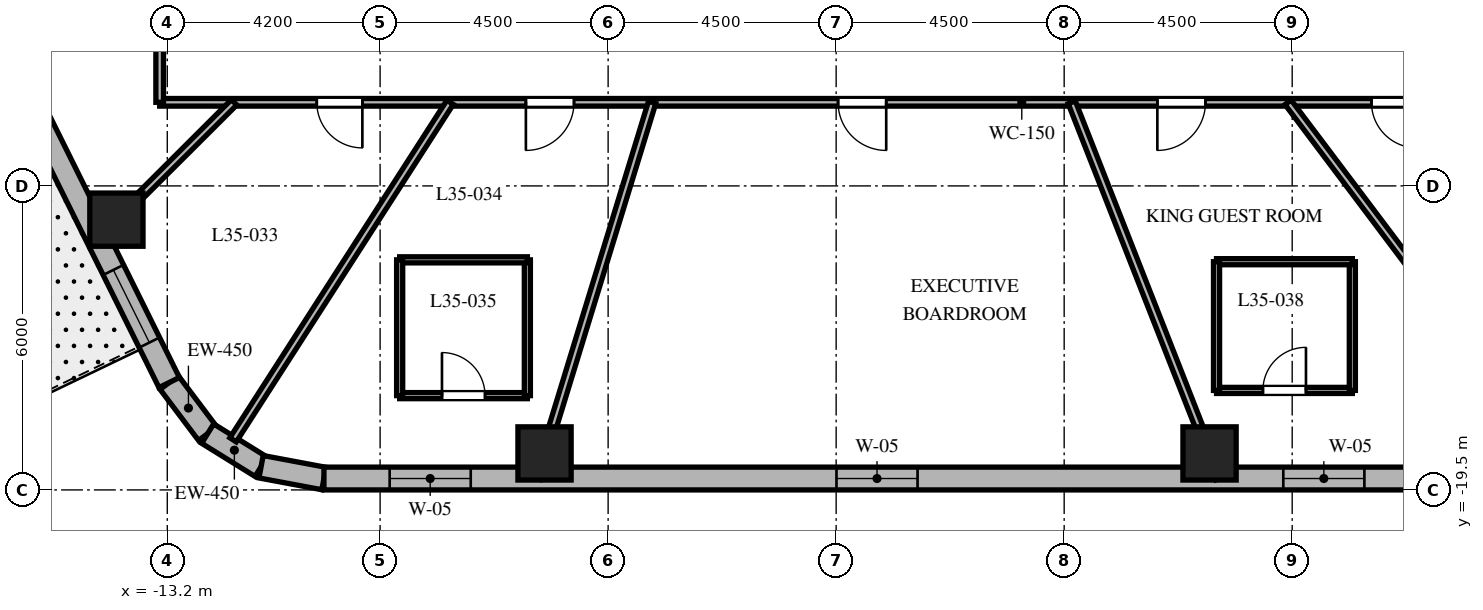
"""IFC4 building model, lengths in metres.
Left out: names, types, materials, properties, quantities, classifications, styles, units other than length and angle.
Written with IfcOpenShell. Run it as: python <this file> out.ifc"""

import sys

from ifc_helpers import new_model, si_unit, direction, frame, frame_2d, origin, origin_2d, place, context, subcontext, project, spatial, rectangle, extrude, element, fill, save


model = new_model("IFC4")
c1 = context("Model", 3, precision=1e-05, world=origin(), true_north=direction((0.0, 1.0)))
c2 = subcontext(c1, "Body", "Model", "MODEL_VIEW")
j1 = project(units=[si_unit("LENGTHUNIT", "METRE"), si_unit("PLANEANGLEUNIT", "RADIAN")], contexts=[c1])
p1 = place(None, origin())
s1 = spatial("IfcSite", under=j1, at=p1, CompositionType="ELEMENT")
p2 = place(p1, origin())
s2 = spatial("IfcBuilding", under=s1, at=p2, CompositionType="ELEMENT")
p3 = place(p2, frame((0.0, 0.0, 144.3)))
s3 = spatial("IfcBuildingStorey", under=s2, at=p3, CompositionType="ELEMENT", Elevation=144.3)
for number, where, z_axis, x_axis in (
    (1, (-5.755, -18.78, 0.0), (0.0, 0.0, 1.0), (1.0, 0.0, 0.0)),
    (2, (7.369, -18.78, 0.0), (0.0, 0.0, 1.0), (1.0, 0.0, 0.0)),
    (3, (-14.204, -14.166, 0.0), (0.0, 0.0, 1.0), (1.0, 0.0, 0.0)),
):
    element("IfcColumn", number, at=place(p3, frame(where, z_axis=z_axis, x_axis=x_axis)), inside=s3, PredefinedType="COLUMN", context=c2, shape_type="SweptSolid", body=[
        extrude(rectangle(XDim=1.05, YDim=1.05, at=origin_2d()), origin(), (0.0, 0.0, 1.0), 3.7),
    ])
p4 = place(p3, frame((-13.162, -17.381, 0.0), z_axis=(0.0, 0.0, 1.0), x_axis=(0.601515770517, -0.798860925205, 0.0)))
e4 = element("IfcWall", 4, at=p4, inside=s3, PredefinedType="SOLIDWALL", context=c2, shape_type="SweptSolid", body=[
    extrude(rectangle(XDim=1.262, YDim=0.45, at=frame_2d((0.631, 0.0))), origin(), (0.0, 0.0, 1.0), 3.4),
])
p5 = place(p3, frame((-12.403, -18.389, 0.0), z_axis=(0.0, 0.0, 1.0), x_axis=(0.849795170926, -0.527113049991, 0.0)))
e5 = element("IfcWall", 5, at=p5, inside=s3, PredefinedType="SOLIDWALL", context=c2, shape_type="SweptSolid", body=[
    extrude(rectangle(XDim=1.241, YDim=0.45, at=frame_2d((0.62, 0.0))), origin(), (0.0, 0.0, 1.0), 3.4),
])
p6 = place(p3, frame((-11.349, -19.043, 0.0), z_axis=(0.0, 0.0, 1.0), x_axis=(0.982931267051, -0.183973161772, 0.0)))
e6 = element("IfcWall", 6, at=p6, inside=s3, PredefinedType="SOLIDWALL", context=c2, shape_type="SweptSolid", body=[
    extrude(rectangle(XDim=1.262, YDim=0.45, at=frame_2d((0.631, 0.0))), origin(), (0.0, 0.0, 1.0), 3.4),
])
p7 = place(p3, frame((-10.108, -19.275, 0.0), z_axis=(0.0, 0.0, 1.0), x_axis=(1.0, 0.0, 0.0)))
e7 = element("IfcWall", 7, at=p7, inside=s3, PredefinedType="SOLIDWALL", context=c2, shape_type="SweptSolid", body=[
    extrude(rectangle(XDim=21.829, YDim=0.45, at=frame_2d((10.915, 0.0))), origin(), (0.0, 0.0, 1.0), 3.4),
])
p8 = place(p7, frame((1.297, 0.0, 0.8)))
e8 = element("IfcOpeningElement", 8, at=p8, cuts=e7, PredefinedType="OPENING", context=c2, shape_type="SweptSolid", body=[
    extrude(rectangle(XDim=1.6, YDim=1.75, at=frame_2d((0.8, 0.875))), frame((0.0, 0.235, 0.0), z_axis=(0.0, -1.0, 0.0), x_axis=(1.0, 0.0, 0.0)), (0.0, 0.0, 1.0), 0.47),
])
p9 = place(p7, frame((10.115, 0.0, 0.8)))
e9 = element("IfcOpeningElement", 9, at=p9, cuts=e7, PredefinedType="OPENING", context=c2, shape_type="SweptSolid", body=[
    extrude(rectangle(XDim=1.6, YDim=1.75, at=frame_2d((0.8, 0.875))), frame((0.0, 0.235, 0.0), z_axis=(0.0, -1.0, 0.0), x_axis=(1.0, 0.0, 0.0)), (0.0, 0.0, 1.0), 0.47),
])
p10 = place(p7, frame((18.933, 0.0, 0.8)))
e10 = element("IfcOpeningElement", 10, at=p10, cuts=e7, PredefinedType="OPENING", context=c2, shape_type="SweptSolid", body=[
    extrude(rectangle(XDim=1.6, YDim=1.75, at=frame_2d((0.8, 0.875))), frame((0.0, 0.235, 0.0), z_axis=(0.0, -1.0, 0.0), x_axis=(1.0, 0.0, 0.0)), (0.0, 0.0, 1.0), 0.47),
])
p11 = place(p3, frame((-20.618, -2.344, 0.0), z_axis=(0.0, 0.0, 1.0), x_axis=(0.444243691097, -0.895905990002, 0.0)))
e11 = element("IfcWall", 11, at=p11, inside=s3, PredefinedType="SOLIDWALL", context=c2, shape_type="SweptSolid", body=[
    extrude(rectangle(XDim=16.784, YDim=0.45, at=frame_2d((8.392, 0.0))), origin(), (0.0, 0.0, 1.0), 3.4),
])
p12 = place(p11, frame((4.535, 0.0, 0.0)))
e12 = element("IfcOpeningElement", 12, at=p12, cuts=e11, PredefinedType="OPENING", context=c2, shape_type="SweptSolid", body=[
    extrude(rectangle(XDim=0.95, YDim=2.15, at=frame_2d((0.475, 1.075))), frame((0.0, 0.235, 0.0), z_axis=(0.0, -1.0, 0.0), x_axis=(1.0, 0.0, 0.0)), (0.0, 0.0, 1.0), 0.47),
])
p13 = place(p11, frame((0.931, 0.0, 0.8)))
e13 = element("IfcOpeningElement", 13, at=p13, cuts=e11, PredefinedType="OPENING", context=c2, shape_type="SweptSolid", body=[
    extrude(rectangle(XDim=1.6, YDim=1.75, at=frame_2d((0.8, 0.875))), frame((0.0, 0.235, 0.0), z_axis=(0.0, -1.0, 0.0), x_axis=(1.0, 0.0, 0.0)), (0.0, 0.0, 1.0), 0.47),
])
p14 = place(p11, frame((7.642, 0.0, 0.8)))
e14 = element("IfcOpeningElement", 14, at=p14, cuts=e11, PredefinedType="OPENING", context=c2, shape_type="SweptSolid", body=[
    extrude(rectangle(XDim=1.6, YDim=1.75, at=frame_2d((0.8, 0.875))), frame((0.0, 0.235, 0.0), z_axis=(0.0, -1.0, 0.0), x_axis=(1.0, 0.0, 0.0)), (0.0, 0.0, 1.0), 0.47),
])
p15 = place(p11, frame((14.303, 0.0, 0.8)))
e15 = element("IfcOpeningElement", 15, at=p15, cuts=e11, PredefinedType="OPENING", context=c2, shape_type="SweptSolid", body=[
    extrude(rectangle(XDim=1.6, YDim=1.75, at=frame_2d((0.8, 0.875))), frame((0.0, 0.235, 0.0), z_axis=(0.0, -1.0, 0.0), x_axis=(1.0, 0.0, 0.0)), (0.0, 0.0, 1.0), 0.47),
])
p16 = place(p3, frame((13.35, -11.85, 0.0), z_axis=(0.0, 0.0, 1.0), x_axis=(-1.0, 0.0, 0.0)))
e16 = element("IfcWall", 16, at=p16, inside=s3, PredefinedType="PARTITIONING", context=c2, shape_type="SweptSolid", body=[
    extrude(rectangle(XDim=26.7, YDim=0.15, at=frame_2d((13.35, 0.0))), origin(), (0.0, 0.0, 1.0), 2.84),
])
p17 = place(p16, frame((22.7, 0.0, 0.0)))
e17 = element("IfcOpeningElement", 17, at=p17, cuts=e16, PredefinedType="OPENING", context=c2, shape_type="SweptSolid", body=[
    extrude(rectangle(XDim=0.9, YDim=2.03, at=frame_2d((0.45, 1.015))), frame((0.0, 0.085, 0.0), z_axis=(0.0, -1.0, 0.0), x_axis=(1.0, 0.0, 0.0)), (0.0, 0.0, 1.0), 0.17),
])
p18 = place(p16, frame((18.523, 0.0, 0.0)))
e18 = element("IfcOpeningElement", 18, at=p18, cuts=e16, PredefinedType="OPENING", context=c2, shape_type="SweptSolid", body=[
    extrude(rectangle(XDim=0.95, YDim=2.03, at=frame_2d((0.475, 1.015))), frame((0.0, 0.085, 0.0), z_axis=(0.0, -1.0, 0.0), x_axis=(1.0, 0.0, 0.0)), (0.0, 0.0, 1.0), 0.17),
])
p19 = place(p16, frame((12.362, 0.0, 0.0)))
e19 = element("IfcOpeningElement", 19, at=p19, cuts=e16, PredefinedType="OPENING", context=c2, shape_type="SweptSolid", body=[
    extrude(rectangle(XDim=0.95, YDim=2.03, at=frame_2d((0.475, 1.015))), frame((0.0, 0.085, 0.0), z_axis=(0.0, -1.0, 0.0), x_axis=(1.0, 0.0, 0.0)), (0.0, 0.0, 1.0), 0.17),
])
p20 = place(p16, frame((6.061, 0.0, 0.0)))
e20 = element("IfcOpeningElement", 20, at=p20, cuts=e16, PredefinedType="OPENING", context=c2, shape_type="SweptSolid", body=[
    extrude(rectangle(XDim=0.95, YDim=2.03, at=frame_2d((0.475, 1.015))), frame((0.0, 0.085, 0.0), z_axis=(0.0, -1.0, 0.0), x_axis=(1.0, 0.0, 0.0)), (0.0, 0.0, 1.0), 0.17),
])
p21 = place(p16, frame((1.886, 0.0, 0.0)))
e21 = element("IfcOpeningElement", 21, at=p21, cuts=e16, PredefinedType="OPENING", context=c2, shape_type="SweptSolid", body=[
    extrude(rectangle(XDim=0.9, YDim=2.03, at=frame_2d((0.45, 1.015))), frame((0.0, 0.085, 0.0), z_axis=(0.0, -1.0, 0.0), x_axis=(1.0, 0.0, 0.0)), (0.0, 0.0, 1.0), 0.17),
])
p22 = place(p3, frame((-13.35, -11.85, 0.0), z_axis=(0.0, 0.0, 1.0), x_axis=(0.0, 1.0, 0.0)))
e22 = element("IfcWall", 22, at=p22, inside=s3, PredefinedType="PARTITIONING", context=c2, shape_type="SweptSolid", body=[
    extrude(rectangle(XDim=23.7, YDim=0.15, at=frame_2d((11.85, 0.0))), origin(), (0.0, 0.0, 1.0), 2.84),
])
p23 = place(p22, frame((18.389, 0.0, 0.0)))
e23 = element("IfcOpeningElement", 23, at=p23, cuts=e22, PredefinedType="OPENING", context=c2, shape_type="SweptSolid", body=[
    extrude(rectangle(XDim=0.95, YDim=2.03, at=frame_2d((0.475, 1.015))), frame((0.0, 0.085, 0.0), z_axis=(0.0, -1.0, 0.0), x_axis=(1.0, 0.0, 0.0)), (0.0, 0.0, 1.0), 0.17),
])
p24 = place(p22, frame((12.315, 0.0, 0.0)))
e24 = element("IfcOpeningElement", 24, at=p24, cuts=e22, PredefinedType="OPENING", context=c2, shape_type="SweptSolid", body=[
    extrude(rectangle(XDim=0.9, YDim=2.03, at=frame_2d((0.45, 1.015))), frame((0.0, 0.085, 0.0), z_axis=(0.0, -1.0, 0.0), x_axis=(1.0, 0.0, 0.0)), (0.0, 0.0, 1.0), 0.17),
])
p25 = place(p22, frame((9.27, 0.0, 0.0)))
e25 = element("IfcOpeningElement", 25, at=p25, cuts=e22, PredefinedType="OPENING", context=c2, shape_type="SweptSolid", body=[
    extrude(rectangle(XDim=0.9, YDim=2.03, at=frame_2d((0.45, 1.015))), frame((0.0, 0.085, 0.0), z_axis=(0.0, -1.0, 0.0), x_axis=(1.0, 0.0, 0.0)), (0.0, 0.0, 1.0), 0.17),
])
p26 = place(p22, frame((3.765, 0.0, 0.0)))
e26 = element("IfcOpeningElement", 26, at=p26, cuts=e22, PredefinedType="OPENING", context=c2, shape_type="SweptSolid", body=[
    extrude(rectangle(XDim=0.9, YDim=2.03, at=frame_2d((0.45, 1.015))), frame((0.0, 0.085, 0.0), z_axis=(0.0, -1.0, 0.0), x_axis=(1.0, 0.0, 0.0)), (0.0, 0.0, 1.0), 0.17),
])
p27 = place(p3, frame((-11.882, -11.85, 0.0), z_axis=(0.0, 0.0, 1.0), x_axis=(-0.708037373639, -0.706174962407, 0.0)))
e27 = element("IfcWall", 27, at=p27, inside=s3, PredefinedType="PARTITIONING", context=c2, shape_type="SweptSolid", body=[
    extrude(rectangle(XDim=3.802, YDim=0.15, at=frame_2d((1.901, 0.0))), origin(), (0.0, 0.0, 1.0), 2.64),
])
p28 = place(p3, frame((-7.619, -11.85, 0.0), z_axis=(0.0, 0.0, 1.0), x_axis=(-0.540829263478, -0.841132396098, 0.0)))
e28 = element("IfcWall", 28, at=p28, inside=s3, PredefinedType="PARTITIONING", context=c2, shape_type="SweptSolid", body=[
    extrude(rectangle(XDim=7.919, YDim=0.15, at=frame_2d((3.959, 0.0))), origin(), (0.0, 0.0, 1.0), 2.64),
])
p29 = place(p3, frame((-3.631, -11.85, 0.0), z_axis=(0.0, 0.0, 1.0), x_axis=(-0.293007573338, -0.956110120209, 0.0)))
e29 = element("IfcWall", 29, at=p29, inside=s3, PredefinedType="PARTITIONING", context=c2, shape_type="SweptSolid", body=[
    extrude(rectangle(XDim=7.766, YDim=0.15, at=frame_2d((3.883, 0.0))), origin(), (0.0, 0.0, 1.0), 2.64),
])
p30 = place(p3, frame((4.65, -11.85, 0.0), z_axis=(0.0, 0.0, 1.0), x_axis=(0.365265947993, -0.930903210456, 0.0)))
e30 = element("IfcWall", 30, at=p30, inside=s3, PredefinedType="PARTITIONING", context=c2, shape_type="SweptSolid", body=[
    extrude(rectangle(XDim=7.976, YDim=0.15, at=frame_2d((3.988, 0.0))), origin(), (0.0, 0.0, 1.0), 2.64),
])
p31 = place(p3, frame((8.918, -11.85, 0.0), z_axis=(0.0, 0.0, 1.0), x_axis=(0.601347965064, -0.798987249531, 0.0)))
e31 = element("IfcWall", 31, at=p31, inside=s3, PredefinedType="PARTITIONING", context=c2, shape_type="SweptSolid", body=[
    extrude(rectangle(XDim=8.08, YDim=0.15, at=frame_2d((4.04, 0.0))), origin(), (0.0, 0.0, 1.0), 2.64),
])
p32 = place(p3, frame((-8.614, -17.639, 0.0), z_axis=(0.0, 0.0, 1.0), x_axis=(1.0, 0.0, 0.0)))
e32 = element("IfcWall", 32, at=p32, inside=s3, PredefinedType="PARTITIONING", context=c2, shape_type="SweptSolid", body=[
    extrude(rectangle(XDim=2.52, YDim=0.12, at=frame_2d((1.26, 0.0))), origin(), (0.0, 0.0, 1.0), 2.64),
])
p33 = place(p32, frame((0.835, 0.0, 0.0)))
e33 = element("IfcOpeningElement", 33, at=p33, cuts=e32, PredefinedType="OPENING", context=c2, shape_type="SweptSolid", body=[
    extrude(rectangle(XDim=0.85, YDim=2.03, at=frame_2d((0.425, 1.015))), frame((0.0, 0.07, 0.0), z_axis=(0.0, -1.0, 0.0), x_axis=(1.0, 0.0, 0.0)), (0.0, 0.0, 1.0), 0.14),
])
p34 = place(p3, frame((-6.094, -17.639, 0.0), z_axis=(0.0, 0.0, 1.0), x_axis=(0.0, 1.0, 0.0)))
e34 = element("IfcWall", 34, at=p34, inside=s3, PredefinedType="PARTITIONING", context=c2, shape_type="SweptSolid", body=[
    extrude(rectangle(XDim=2.68, YDim=0.12, at=frame_2d((1.34, 0.0))), origin(), (0.0, 0.0, 1.0), 3.4),
])
p35 = place(p3, frame((-6.094, -14.959, 0.0), z_axis=(0.0, 0.0, 1.0), x_axis=(-1.0, 0.0, 0.0)))
e35 = element("IfcWall", 35, at=p35, inside=s3, PredefinedType="PARTITIONING", context=c2, shape_type="SweptSolid", body=[
    extrude(rectangle(XDim=2.52, YDim=0.12, at=frame_2d((1.26, 0.0))), origin(), (0.0, 0.0, 1.0), 3.4),
])
p36 = place(p3, frame((-8.614, -14.959, 0.0), z_axis=(0.0, 0.0, 1.0), x_axis=(0.0, -1.0, 0.0)))
e36 = element("IfcWall", 36, at=p36, inside=s3, PredefinedType="PARTITIONING", context=c2, shape_type="SweptSolid", body=[
    extrude(rectangle(XDim=2.68, YDim=0.12, at=frame_2d((1.34, 0.0))), origin(), (0.0, 0.0, 1.0), 2.64),
])
p37 = place(p3, frame((7.507, -17.536, 0.0), z_axis=(0.0, 0.0, 1.0), x_axis=(1.0, 0.0, 0.0)))
e37 = element("IfcWall", 37, at=p37, inside=s3, PredefinedType="PARTITIONING", context=c2, shape_type="SweptSolid", body=[
    extrude(rectangle(XDim=2.68, YDim=0.12, at=frame_2d((1.34, 0.0))), origin(), (0.0, 0.0, 1.0), 2.64),
])
p38 = place(p37, frame((0.915, 0.0, 0.0)))
e38 = element("IfcOpeningElement", 38, at=p38, cuts=e37, PredefinedType="OPENING", context=c2, shape_type="SweptSolid", body=[
    extrude(rectangle(XDim=0.85, YDim=2.03, at=frame_2d((0.425, 1.015))), frame((0.0, 0.07, 0.0), z_axis=(0.0, -1.0, 0.0), x_axis=(1.0, 0.0, 0.0)), (0.0, 0.0, 1.0), 0.14),
])
p39 = place(p3, frame((10.187, -17.536, 0.0), z_axis=(0.0, 0.0, 1.0), x_axis=(0.0, 1.0, 0.0)))
e39 = element("IfcWall", 39, at=p39, inside=s3, PredefinedType="PARTITIONING", context=c2, shape_type="SweptSolid", body=[
    extrude(rectangle(XDim=2.54, YDim=0.12, at=frame_2d((1.27, 0.0))), origin(), (0.0, 0.0, 1.0), 2.64),
])
p40 = place(p3, frame((10.187, -14.996, 0.0), z_axis=(0.0, 0.0, 1.0), x_axis=(-1.0, 0.0, 0.0)))
e40 = element("IfcWall", 40, at=p40, inside=s3, PredefinedType="PARTITIONING", context=c2, shape_type="SweptSolid", body=[
    extrude(rectangle(XDim=2.68, YDim=0.12, at=frame_2d((1.34, 0.0))), origin(), (0.0, 0.0, 1.0), 2.84),
])
p41 = place(p3, frame((7.507, -14.996, 0.0), z_axis=(0.0, 0.0, 1.0), x_axis=(0.0, -1.0, 0.0)))
e41 = element("IfcWall", 41, at=p41, inside=s3, PredefinedType="PARTITIONING", context=c2, shape_type="SweptSolid", body=[
    extrude(rectangle(XDim=2.54, YDim=0.12, at=frame_2d((1.27, 0.0))), origin(), (0.0, 0.0, 1.0), 2.84),
])
p42 = place(p8, origin())
e42 = element("IfcWindow", 42, at=p42, inside=s3, PartitioningType="SINGLE_PANEL", PredefinedType="WINDOW", context=c2, shape_type="SweptSolid", body=[
    extrude(rectangle(XDim=1.6, YDim=1.75, at=frame_2d((0.8, 0.875))), frame((0.0, 0.03, 0.0), z_axis=(0.0, -1.0, 0.0), x_axis=(1.0, 0.0, 0.0)), (0.0, 0.0, 1.0), 0.06),
])
fill(e8, e42)
p43 = place(p9, origin())
e43 = element("IfcWindow", 43, at=p43, inside=s3, PartitioningType="SINGLE_PANEL", PredefinedType="WINDOW", context=c2, shape_type="SweptSolid", body=[
    extrude(rectangle(XDim=1.6, YDim=1.75, at=frame_2d((0.8, 0.875))), frame((0.0, 0.03, 0.0), z_axis=(0.0, -1.0, 0.0), x_axis=(1.0, 0.0, 0.0)), (0.0, 0.0, 1.0), 0.06),
])
fill(e9, e43)
p44 = place(p10, origin())
e44 = element("IfcWindow", 44, at=p44, inside=s3, PartitioningType="SINGLE_PANEL", PredefinedType="WINDOW", context=c2, shape_type="SweptSolid", body=[
    extrude(rectangle(XDim=1.6, YDim=1.75, at=frame_2d((0.8, 0.875))), frame((0.0, 0.03, 0.0), z_axis=(0.0, -1.0, 0.0), x_axis=(1.0, 0.0, 0.0)), (0.0, 0.0, 1.0), 0.06),
])
fill(e10, e44)
p45 = place(p15, origin())
e45 = element("IfcWindow", 45, at=p45, inside=s3, PartitioningType="SINGLE_PANEL", PredefinedType="WINDOW", context=c2, shape_type="SweptSolid", body=[
    extrude(rectangle(XDim=1.6, YDim=1.75, at=frame_2d((0.8, 0.875))), frame((0.0, 0.03, 0.0), z_axis=(0.0, -1.0, 0.0), x_axis=(1.0, 0.0, 0.0)), (0.0, 0.0, 1.0), 0.06),
])
fill(e15, e45)
p46 = place(p17, origin())
e46 = element("IfcDoor", 46, at=p46, inside=s3, OperationType="SINGLE_SWING_LEFT", PredefinedType="DOOR", context=c2, shape_type="SweptSolid", body=[
    extrude(rectangle(XDim=0.9, YDim=2.03, at=frame_2d((0.45, 1.015))), frame((0.0, 0.025, 0.0), z_axis=(0.0, -1.0, 0.0), x_axis=(1.0, 0.0, 0.0)), (0.0, 0.0, 1.0), 0.05),
])
fill(e17, e46)
p47 = place(p18, origin())
e47 = element("IfcDoor", 47, at=p47, inside=s3, OperationType="SINGLE_SWING_RIGHT", PredefinedType="DOOR", context=c2, shape_type="SweptSolid", body=[
    extrude(rectangle(XDim=0.95, YDim=2.03, at=frame_2d((0.475, 1.015))), frame((0.0, 0.025, 0.0), z_axis=(0.0, -1.0, 0.0), x_axis=(1.0, 0.0, 0.0)), (0.0, 0.0, 1.0), 0.05),
])
fill(e18, e47)
p48 = place(p33, origin())
e48 = element("IfcDoor", 48, at=p48, inside=s3, OperationType="SINGLE_SWING_LEFT", PredefinedType="DOOR", context=c2, shape_type="SweptSolid", body=[
    extrude(rectangle(XDim=0.85, YDim=2.03, at=frame_2d((0.425, 1.015))), frame((0.0, 0.025, 0.0), z_axis=(0.0, -1.0, 0.0), x_axis=(1.0, 0.0, 0.0)), (0.0, 0.0, 1.0), 0.05),
])
fill(e33, e48)
p49 = place(p19, origin())
e49 = element("IfcDoor", 49, at=p49, inside=s3, OperationType="SINGLE_SWING_LEFT", PredefinedType="DOOR", context=c2, shape_type="SweptSolid", body=[
    extrude(rectangle(XDim=0.95, YDim=2.03, at=frame_2d((0.475, 1.015))), frame((0.0, 0.025, 0.0), z_axis=(0.0, -1.0, 0.0), x_axis=(1.0, 0.0, 0.0)), (0.0, 0.0, 1.0), 0.05),
])
fill(e19, e49)
p50 = place(p20, origin())
e50 = element("IfcDoor", 50, at=p50, inside=s3, OperationType="SINGLE_SWING_RIGHT", PredefinedType="DOOR", context=c2, shape_type="SweptSolid", body=[
    extrude(rectangle(XDim=0.95, YDim=2.03, at=frame_2d((0.475, 1.015))), frame((0.0, 0.025, 0.0), z_axis=(0.0, -1.0, 0.0), x_axis=(1.0, 0.0, 0.0)), (0.0, 0.0, 1.0), 0.05),
])
fill(e20, e50)
p51 = place(p38, origin())
e51 = element("IfcDoor", 51, at=p51, inside=s3, OperationType="SINGLE_SWING_RIGHT", PredefinedType="DOOR", context=c2, shape_type="SweptSolid", body=[
    extrude(rectangle(XDim=0.85, YDim=2.03, at=frame_2d((0.425, 1.015))), frame((0.0, 0.025, 0.0), z_axis=(0.0, -1.0, 0.0), x_axis=(1.0, 0.0, 0.0)), (0.0, 0.0, 1.0), 0.05),
])
fill(e38, e51)
p52 = place(p21, origin())
e52 = element("IfcDoor", 52, at=p52, inside=s3, OperationType="SINGLE_SWING_LEFT", PredefinedType="DOOR", context=c2, shape_type="SweptSolid", body=[
    extrude(rectangle(XDim=0.9, YDim=2.03, at=frame_2d((0.45, 1.015))), frame((0.0, 0.025, 0.0), z_axis=(0.0, -1.0, 0.0), x_axis=(1.0, 0.0, 0.0)), (0.0, 0.0, 1.0), 0.05),
])
fill(e21, e52)
save(model, sys.argv[1])
